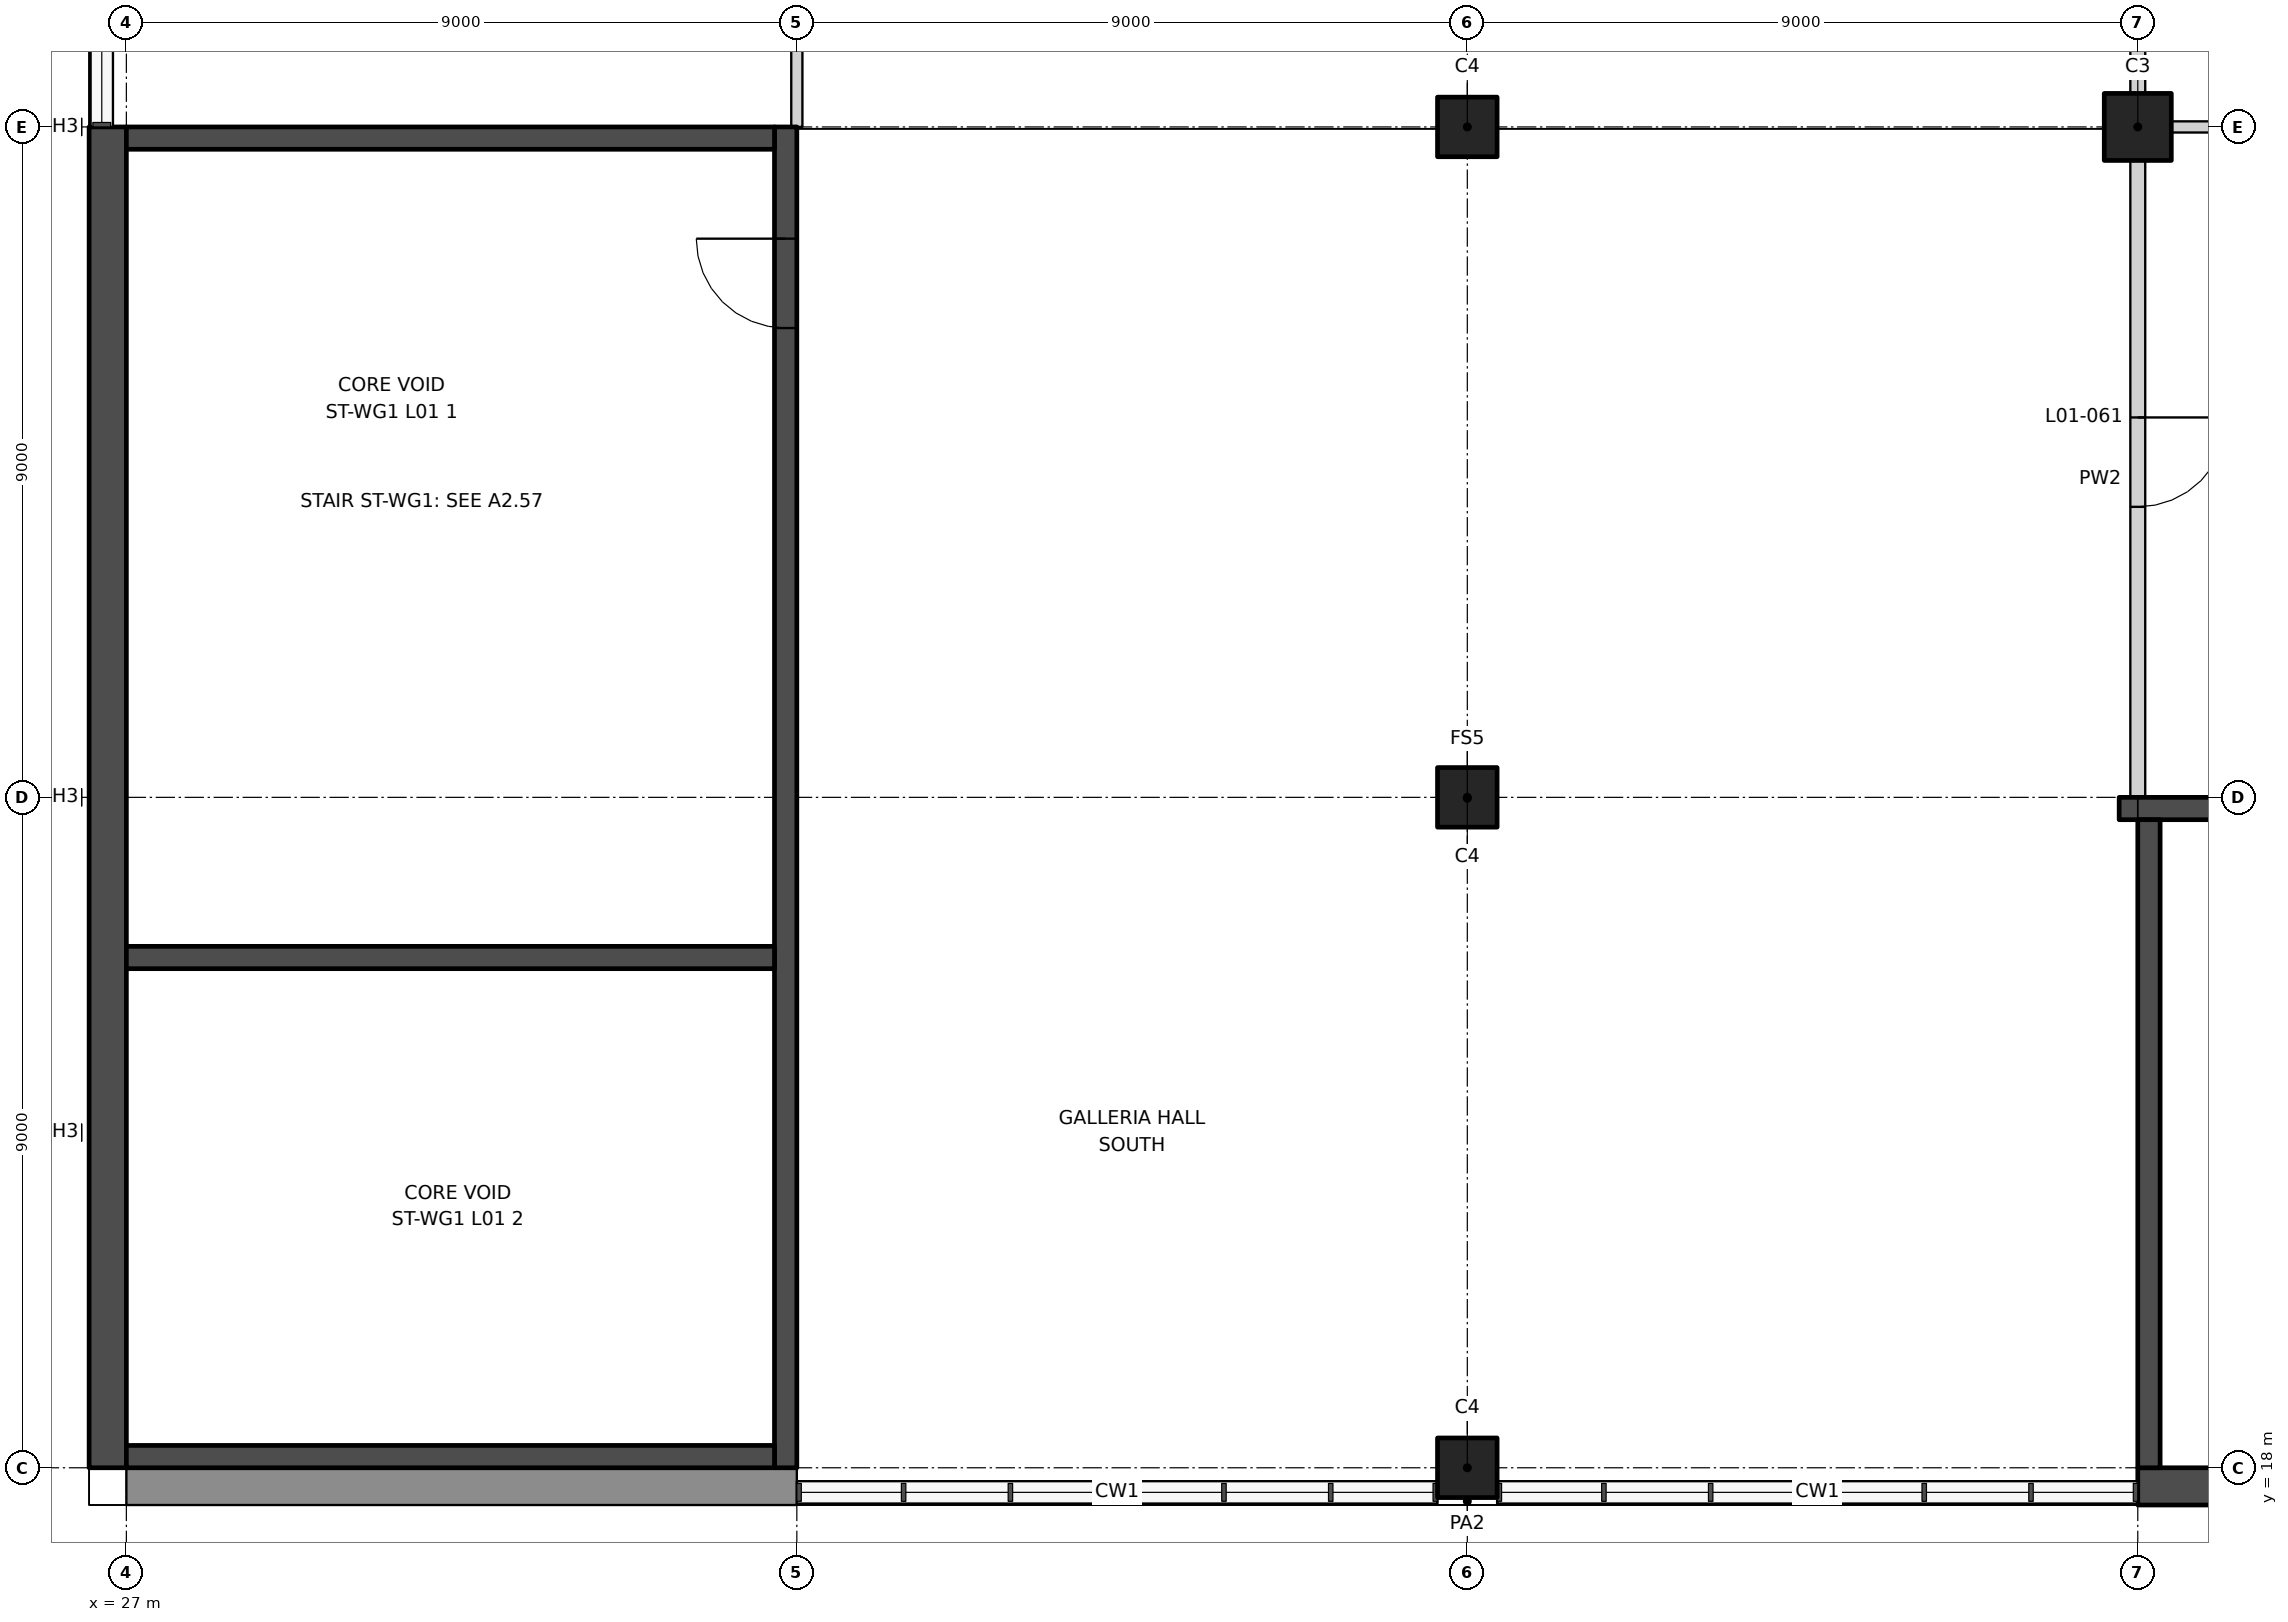
"""IFC4 building model, lengths in metres.
Left out: names, types, materials, properties, quantities, classifications, styles, units other than length and angle.
Written with IfcOpenShell. Run it as: python <this file> out.ifc"""

import sys

from ifc_helpers import new_model, si_unit, direction, frame, frame_2d, origin, origin_2d, place, context, subcontext, project, spatial, rectangle, extrude, element, fill, save


model = new_model("IFC4")
c1 = context("Model", 3, precision=1e-05, world=origin(), true_north=direction((0.0, 1.0)))
c2 = subcontext(c1, "Body", "Model", "MODEL_VIEW")
j1 = project(units=[si_unit("LENGTHUNIT", "METRE"), si_unit("PLANEANGLEUNIT", "RADIAN")], contexts=[c1])
p1 = place(None, origin())
s1 = spatial("IfcSite", under=j1, at=p1, CompositionType="ELEMENT")
p2 = place(p1, origin())
s2 = spatial("IfcBuilding", under=s1, at=p2, CompositionType="ELEMENT")
p3 = place(p2, frame((0.0, 0.0, 7.0)))
s3 = spatial("IfcBuildingStorey", under=s2, at=p3, CompositionType="ELEMENT", Elevation=7.0)
p4 = place(p3, frame((54.0, 36.0, 0.0), z_axis=(0.0, 0.0, 1.0), x_axis=(1.0, 0.0, 0.0)))
e1 = element("IfcColumn", 1, at=p4, inside=s3, PredefinedType="COLUMN", context=c2, shape_type="SweptSolid", body=[
    extrude(rectangle(XDim=0.9, YDim=0.9, at=origin_2d()), origin(), (0.0, 0.0, 1.0), 4.5),
])
for number, where, z_axis, x_axis in (
    (2, (45.0, 18.0, 0.0), (0.0, 0.0, 1.0), (1.0, 0.0, 0.0)),
    (3, (45.0, 27.0, 0.0), (0.0, 0.0, 1.0), (1.0, 0.0, 0.0)),
    (4, (45.0, 36.0, 0.0), (0.0, 0.0, 1.0), (1.0, 0.0, 0.0)),
):
    element("IfcColumn", number, at=place(p3, frame(where, z_axis=z_axis, x_axis=x_axis)), inside=s3, PredefinedType="COLUMN", context=c2, shape_type="SweptSolid", body=[
        extrude(rectangle(XDim=0.8, YDim=0.8, at=origin_2d()), origin(), (0.0, 0.0, 1.0), 4.5),
    ])
p5 = place(p3, frame((54.45, 36.0, 0.0), z_axis=(0.0, 0.0, 1.0), x_axis=(1.0, 0.0, 0.0)))
e5 = element("IfcWall", 5, at=p5, inside=s3, PredefinedType="PARTITIONING", context=c2, shape_type="SweptSolid", body=[
    extrude(rectangle(XDim=8.15, YDim=0.15, at=frame_2d((4.075, 0.0))), origin(), (0.0, 0.0, 1.0), 3.25),
])
p6 = place(p3, frame((36.0, 36.0, 0.0), z_axis=(0.0, 0.0, 1.0), x_axis=(0.0, 1.0, 0.0)))
e6 = element("IfcWall", 6, at=p6, inside=s3, PredefinedType="PARTITIONING", context=c2, shape_type="SweptSolid", body=[
    extrude(rectangle(XDim=8.6, YDim=0.15, at=frame_2d((4.3, 0.0))), origin(), (0.0, 0.0, 1.0), 3.25),
])
p7 = place(p6, frame((3.4, 0.0, 0.0)))
e7 = element("IfcOpeningElement", 7, at=p7, cuts=e6, PredefinedType="OPENING", context=c2, shape_type="SweptSolid", body=[
    extrude(rectangle(XDim=1.8, YDim=2.1, at=frame_2d((0.9, 1.05))), frame((0.0, 0.085, 0.0), z_axis=(0.0, -1.0, 0.0), x_axis=(1.0, 0.0, 0.0)), (0.0, 0.0, 1.0), 0.17),
])
p8 = place(p3, frame((54.0, 27.0, 0.0), z_axis=(0.0, 0.0, 1.0), x_axis=(0.0, 1.0, 0.0)))
e8 = element("IfcWall", 8, at=p8, inside=s3, PredefinedType="PARTITIONING", context=c2, shape_type="SweptSolid", body=[
    extrude(rectangle(XDim=8.55, YDim=0.2, at=frame_2d((4.275, 0.0))), origin(), (0.0, 0.0, 1.0), 3.25),
])
p9 = place(p8, frame((3.9, 0.0, 0.0)))
e9 = element("IfcOpeningElement", 9, at=p9, cuts=e8, PredefinedType="OPENING", context=c2, shape_type="SweptSolid", body=[
    extrude(rectangle(XDim=1.2, YDim=2.1, at=frame_2d((0.6, 1.05))), frame((0.0, 0.11, 0.0), z_axis=(0.0, -1.0, 0.0), x_axis=(1.0, 0.0, 0.0)), (0.0, 0.0, 1.0), 0.22),
])
p10 = place(p3, frame((54.0, 36.45, 0.0), z_axis=(0.0, 0.0, 1.0), x_axis=(0.0, 1.0, 0.0)))
e10 = element("IfcWall", 10, at=p10, inside=s3, PredefinedType="PARTITIONING", context=c2, shape_type="SweptSolid", body=[
    extrude(rectangle(XDim=8.1, YDim=0.2, at=frame_2d((4.05, 0.0))), origin(), (0.0, 0.0, 1.0), 3.25),
])
p11 = place(p3, frame((27.0, 17.75, 0.0), z_axis=(0.0, 0.0, 1.0), x_axis=(1.0, 0.0, 0.0)))
e11 = element("IfcWall", 11, at=p11, inside=s3, PredefinedType="SOLIDWALL", context=c2, shape_type="SweptSolid", body=[
    extrude(rectangle(XDim=9.0, YDim=0.5, at=frame_2d((4.5, 0.0))), origin(), (0.0, 0.0, 1.0), 4.5),
])
p12 = place(p3, frame((72.0, 26.85, 0.0), z_axis=(0.0, 0.0, 1.0), x_axis=(-1.0, 0.0, 0.0)))
e12 = element("IfcWall", 12, at=p12, inside=s3, PredefinedType="SHEAR", context=c2, shape_type="SweptSolid", body=[
    extrude(rectangle(XDim=18.25, YDim=0.3, at=frame_2d((9.125, 0.0))), origin(), (0.0, 0.0, 1.0), 4.5),
])
p13 = place(p12, frame((8.6, 0.0, 0.0)))
e13 = element("IfcOpeningElement", 13, at=p13, cuts=e12, PredefinedType="OPENING", context=c2, shape_type="SweptSolid", body=[
    extrude(rectangle(XDim=1.2, YDim=2.1, at=frame_2d((0.6, 1.05))), frame((0.0, 0.16, 0.0), z_axis=(0.0, -1.0, 0.0), x_axis=(1.0, 0.0, 0.0)), (0.0, 0.0, 1.0), 0.32),
])
p14 = place(p3, frame((72.0, 17.75, 0.0), z_axis=(0.0, 0.0, 1.0), x_axis=(-1.0, 0.0, 0.0)))
e14 = element("IfcWall", 14, at=p14, inside=s3, PredefinedType="SHEAR", context=c2, shape_type="SweptSolid", body=[
    extrude(rectangle(XDim=18.0, YDim=0.5, at=frame_2d((9.0, 0.0))), origin(), (0.0, 0.0, 1.0), 4.5),
])
p15 = place(p3, frame((54.15, 26.7, 0.0), z_axis=(0.0, 0.0, 1.0), x_axis=(0.0, -1.0, 0.0)))
e15 = element("IfcWall", 15, at=p15, inside=s3, PredefinedType="SHEAR", context=c2, shape_type="SweptSolid", body=[
    extrude(rectangle(XDim=8.7, YDim=0.3, at=frame_2d((4.35, 0.0))), origin(), (0.0, 0.0, 1.0), 4.5),
])
p16 = place(p3, frame((35.85, 36.0, 0.0), z_axis=(0.0, 0.0, 1.0), x_axis=(0.0, -1.0, 0.0)))
e16 = element("IfcWall", 16, at=p16, inside=s3, PredefinedType="SHEAR", context=c2, shape_type="SweptSolid", body=[
    extrude(rectangle(XDim=18.0, YDim=0.3, at=frame_2d((9.0, 0.0))), origin(), (0.0, 0.0, 1.0), 4.5),
])
p17 = place(p16, frame((1.5, 0.0, 0.0)))
e17 = element("IfcOpeningElement", 17, at=p17, cuts=e16, PredefinedType="OPENING", context=c2, shape_type="SweptSolid", body=[
    extrude(rectangle(XDim=1.2, YDim=2.1, at=frame_2d((0.6, 1.05))), frame((0.0, 0.16, 0.0), z_axis=(0.0, -1.0, 0.0), x_axis=(1.0, 0.0, 0.0)), (0.0, 0.0, 1.0), 0.32),
])
p18 = place(p3, frame((26.75, 36.0, 0.0), z_axis=(0.0, 0.0, 1.0), x_axis=(0.0, -1.0, 0.0)))
e18 = element("IfcWall", 18, at=p18, inside=s3, PredefinedType="SHEAR", context=c2, shape_type="SweptSolid", body=[
    extrude(rectangle(XDim=18.0, YDim=0.5, at=frame_2d((9.0, 0.0))), origin(), (0.0, 0.0, 1.0), 4.5),
])
for number, where, z_axis, x_axis in (
    (19, (35.7, 35.85, 0.0), (0.0, 0.0, 1.0), (-1.0, 0.0, 0.0)),
    (20, (35.7, 18.15, 0.0), (0.0, 0.0, 1.0), (-1.0, 0.0, 0.0)),
    (21, (35.7, 24.85, 0.0), (0.0, 0.0, 1.0), (-1.0, 0.0, 0.0)),
):
    element("IfcWall", number, at=place(p3, frame(where, z_axis=z_axis, x_axis=x_axis)), inside=s3, PredefinedType="SHEAR", context=c2, shape_type="SweptSolid", body=[
        extrude(rectangle(XDim=8.7, YDim=0.3, at=frame_2d((4.35, 0.0))), origin(), (0.0, 0.0, 1.0), 4.5),
    ])
p19 = place(p9, frame((1.2, 0.0, 0.0), z_axis=(0.0, 0.0, 1.0), x_axis=(-1.0, 0.0, 0.0)))
e22 = element("IfcDoor", 22, at=p19, inside=s3, OperationType="SINGLE_SWING_LEFT", PredefinedType="DOOR", context=c2, shape_type="SweptSolid", body=[
    extrude(rectangle(XDim=1.2, YDim=2.1, at=frame_2d((0.6, 1.05))), frame((0.0, 0.025, 0.0), z_axis=(0.0, -1.0, 0.0), x_axis=(1.0, 0.0, 0.0)), (0.0, 0.0, 1.0), 0.05),
])
fill(e9, e22)
p20 = place(p17, frame((1.2, 0.0, 0.0), z_axis=(0.0, 0.0, 1.0), x_axis=(-1.0, 0.0, 0.0)))
e23 = element("IfcDoor", 23, at=p20, inside=s3, OperationType="SINGLE_SWING_RIGHT", PredefinedType="DOOR", context=c2, shape_type="SweptSolid", body=[
    extrude(rectangle(XDim=1.2, YDim=2.1, at=frame_2d((0.6, 1.05))), frame((0.0, 0.025, 0.0), z_axis=(0.0, -1.0, 0.0), x_axis=(1.0, 0.0, 0.0)), (0.0, 0.0, 1.0), 0.05),
])
fill(e17, e23)
save(model, sys.argv[1])
